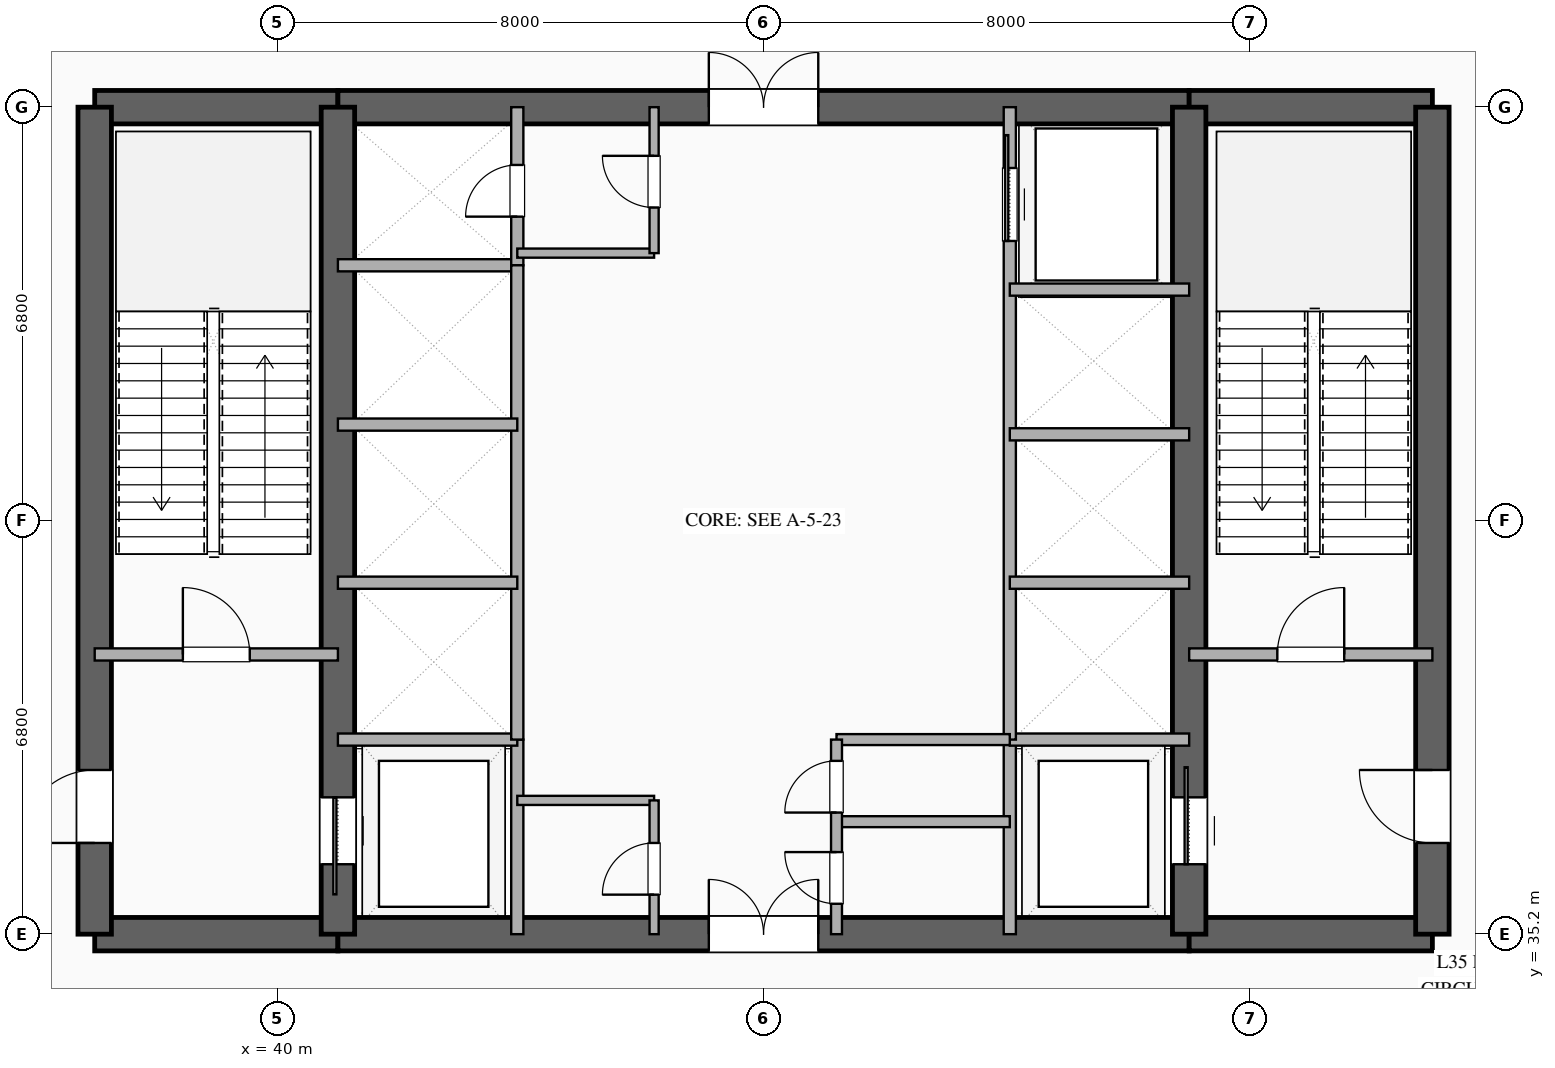
"""IFC4 building model, lengths in metres.
Left out: names, types, materials, properties, quantities, classifications, styles, units other than length and angle.
Written with IfcOpenShell. Run it as: python <this file> out.ifc"""

import sys

from ifc_helpers import new_model, si_unit, direction, frame, frame_2d, origin, place, context, subcontext, project, spatial, rectangle, extrude, element, fill, save


model = new_model("IFC4")
c1 = context("Model", 3, precision=1e-05, world=origin(), true_north=direction((0.0, 1.0)))
c2 = subcontext(c1, "Body", "Model", "MODEL_VIEW")
j1 = project(units=[si_unit("LENGTHUNIT", "METRE"), si_unit("PLANEANGLEUNIT", "RADIAN")], contexts=[c1])
p1 = place(None, origin())
s1 = spatial("IfcSite", under=j1, at=p1, CompositionType="ELEMENT")
p2 = place(p1, origin())
s2 = spatial("IfcBuilding", under=s1, at=p2, CompositionType="ELEMENT")
p3 = place(p2, frame((0.0, 0.0, 139.8)))
s3 = spatial("IfcBuildingStorey", under=s2, at=p3, CompositionType="ELEMENT", Elevation=139.8)
p4 = place(p3, frame((37.0, 35.2, 0.0), z_axis=(0.0, 0.0, 1.0), x_axis=(1.0, 0.0, 0.0)))
e1 = element("IfcWall", 1, at=p4, inside=s3, PredefinedType="SHEAR", context=c2, shape_type="SweptSolid", body=[
    extrude(rectangle(XDim=4.0, YDim=0.55, at=frame_2d((2.0, 0.0))), origin(), (0.0, 0.0, 1.0), 5.05),
])
p5 = place(p3, frame((41.0, 35.2, 0.0), z_axis=(0.0, 0.0, 1.0), x_axis=(1.0, 0.0, 0.0)))
e2 = element("IfcWall", 2, at=p5, inside=s3, PredefinedType="SHEAR", context=c2, shape_type="SweptSolid", body=[
    extrude(rectangle(XDim=14.0, YDim=0.55, at=frame_2d((7.0, 0.0))), origin(), (0.0, 0.0, 1.0), 5.05),
])
p6 = place(p5, frame((6.1, 0.0, 0.0)))
e3 = element("IfcOpeningElement", 3, at=p6, cuts=e2, PredefinedType="OPENING", context=c2, shape_type="SweptSolid", body=[
    extrude(rectangle(XDim=1.8, YDim=2.25, at=frame_2d((0.9, 1.125))), frame((0.0, 0.285, 0.0), z_axis=(0.0, -1.0, 0.0), x_axis=(1.0, 0.0, 0.0)), (0.0, 0.0, 1.0), 0.57),
])
for number, where, z_axis, x_axis in (
    (4, (55.0, 35.2, 0.0), (0.0, 0.0, 1.0), (1.0, 0.0, 0.0)),
    (5, (37.0, 48.8, 0.0), (0.0, 0.0, 1.0), (1.0, 0.0, 0.0)),
):
    element("IfcWall", number, at=place(p3, frame(where, z_axis=z_axis, x_axis=x_axis)), inside=s3, PredefinedType="SHEAR", context=c2, shape_type="SweptSolid", body=[
        extrude(rectangle(XDim=4.0, YDim=0.55, at=frame_2d((2.0, 0.0))), origin(), (0.0, 0.0, 1.0), 5.05),
    ])
p7 = place(p3, frame((41.0, 48.8, 0.0), z_axis=(0.0, 0.0, 1.0), x_axis=(1.0, 0.0, 0.0)))
e6 = element("IfcWall", 6, at=p7, inside=s3, PredefinedType="SHEAR", context=c2, shape_type="SweptSolid", body=[
    extrude(rectangle(XDim=14.0, YDim=0.55, at=frame_2d((7.0, 0.0))), origin(), (0.0, 0.0, 1.0), 5.05),
])
p8 = place(p7, frame((6.1, 0.0, 0.0)))
e7 = element("IfcOpeningElement", 7, at=p8, cuts=e6, PredefinedType="OPENING", context=c2, shape_type="SweptSolid", body=[
    extrude(rectangle(XDim=1.8, YDim=2.25, at=frame_2d((0.9, 1.125))), frame((0.0, 0.285, 0.0), z_axis=(0.0, -1.0, 0.0), x_axis=(1.0, 0.0, 0.0)), (0.0, 0.0, 1.0), 0.57),
])
p9 = place(p3, frame((55.0, 48.8, 0.0), z_axis=(0.0, 0.0, 1.0), x_axis=(1.0, 0.0, 0.0)))
e8 = element("IfcWall", 8, at=p9, inside=s3, PredefinedType="SHEAR", context=c2, shape_type="SweptSolid", body=[
    extrude(rectangle(XDim=4.0, YDim=0.55, at=frame_2d((2.0, 0.0))), origin(), (0.0, 0.0, 1.0), 5.05),
])
p10 = place(p3, frame((37.0, 35.2, 0.0), z_axis=(0.0, 0.0, 1.0), x_axis=(0.0, 1.0, 0.0)))
e9 = element("IfcWall", 9, at=p10, inside=s3, PredefinedType="SHEAR", context=c2, shape_type="SweptSolid", body=[
    extrude(rectangle(XDim=13.6, YDim=0.55, at=frame_2d((6.8, 0.0))), origin(), (0.0, 0.0, 1.0), 5.05),
])
p11 = place(p10, frame((1.5, 0.0, 0.0)))
e10 = element("IfcOpeningElement", 10, at=p11, cuts=e9, PredefinedType="OPENING", context=c2, shape_type="SweptSolid", body=[
    extrude(rectangle(XDim=1.2, YDim=2.15, at=frame_2d((0.6, 1.075))), frame((0.0, 0.285, 0.0), z_axis=(0.0, -1.0, 0.0), x_axis=(1.0, 0.0, 0.0)), (0.0, 0.0, 1.0), 0.57),
])
p12 = place(p3, frame((59.0, 35.2, 0.0), z_axis=(0.0, 0.0, 1.0), x_axis=(0.0, 1.0, 0.0)))
e11 = element("IfcWall", 11, at=p12, inside=s3, PredefinedType="SHEAR", context=c2, shape_type="SweptSolid", body=[
    extrude(rectangle(XDim=13.6, YDim=0.55, at=frame_2d((6.8, 0.0))), origin(), (0.0, 0.0, 1.0), 5.05),
])
p13 = place(p12, frame((1.5, 0.0, 0.0)))
e12 = element("IfcOpeningElement", 12, at=p13, cuts=e11, PredefinedType="OPENING", context=c2, shape_type="SweptSolid", body=[
    extrude(rectangle(XDim=1.2, YDim=2.15, at=frame_2d((0.6, 1.075))), frame((0.0, 0.285, 0.0), z_axis=(0.0, -1.0, 0.0), x_axis=(1.0, 0.0, 0.0)), (0.0, 0.0, 1.0), 0.57),
])
p14 = place(p3, frame((41.0, 35.2, 0.0), z_axis=(0.0, 0.0, 1.0), x_axis=(0.0, 1.0, 0.0)))
e13 = element("IfcWall", 13, at=p14, inside=s3, PredefinedType="SHEAR", context=c2, shape_type="SweptSolid", body=[
    extrude(rectangle(XDim=13.6, YDim=0.55, at=frame_2d((6.8, 0.0))), origin(), (0.0, 0.0, 1.0), 5.05),
])
p15 = place(p14, frame((1.15, 0.0, 0.0)))
e14 = element("IfcOpeningElement", 14, at=p15, cuts=e13, PredefinedType="OPENING", context=c2, shape_type="SweptSolid", body=[
    extrude(rectangle(XDim=1.1, YDim=2.2, at=frame_2d((0.55, 1.1))), frame((0.0, 0.285, 0.0), z_axis=(0.0, -1.0, 0.0), x_axis=(1.0, 0.0, 0.0)), (0.0, 0.0, 1.0), 0.57),
])
p16 = place(p3, frame((55.0, 35.2, 0.0), z_axis=(0.0, 0.0, 1.0), x_axis=(0.0, 1.0, 0.0)))
e15 = element("IfcWall", 15, at=p16, inside=s3, PredefinedType="SHEAR", context=c2, shape_type="SweptSolid", body=[
    extrude(rectangle(XDim=13.6, YDim=0.55, at=frame_2d((6.8, 0.0))), origin(), (0.0, 0.0, 1.0), 5.05),
])
p17 = place(p16, frame((1.15, 0.0, 0.0)))
e16 = element("IfcOpeningElement", 16, at=p17, cuts=e15, PredefinedType="OPENING", context=c2, shape_type="SweptSolid", body=[
    extrude(rectangle(XDim=1.1, YDim=2.2, at=frame_2d((0.55, 1.1))), frame((0.0, 0.285, 0.0), z_axis=(0.0, -1.0, 0.0), x_axis=(1.0, 0.0, 0.0)), (0.0, 0.0, 1.0), 0.57),
])
p18 = place(p3, frame((37.0, 39.8, 0.0), z_axis=(0.0, 0.0, 1.0), x_axis=(1.0, 0.0, 0.0)))
e17 = element("IfcWall", 17, at=p18, inside=s3, PredefinedType="SOLIDWALL", context=c2, shape_type="SweptSolid", body=[
    extrude(rectangle(XDim=4.0, YDim=0.2, at=frame_2d((2.0, 0.0))), origin(), (0.0, 0.0, 1.0), 3.35),
])
p19 = place(p18, frame((1.45, 0.0, 0.0)))
e18 = element("IfcOpeningElement", 18, at=p19, cuts=e17, PredefinedType="OPENING", context=c2, shape_type="SweptSolid", body=[
    extrude(rectangle(XDim=1.1, YDim=2.15, at=frame_2d((0.55, 1.075))), frame((0.0, 0.11, 0.0), z_axis=(0.0, -1.0, 0.0), x_axis=(1.0, 0.0, 0.0)), (0.0, 0.0, 1.0), 0.22),
])
p20 = place(p3, frame((55.0, 39.8, 0.0), z_axis=(0.0, 0.0, 1.0), x_axis=(1.0, 0.0, 0.0)))
e19 = element("IfcWall", 19, at=p20, inside=s3, PredefinedType="SOLIDWALL", context=c2, shape_type="SweptSolid", body=[
    extrude(rectangle(XDim=4.0, YDim=0.2, at=frame_2d((2.0, 0.0))), origin(), (0.0, 0.0, 1.0), 3.35),
])
p21 = place(p20, frame((1.45, 0.0, 0.0)))
e20 = element("IfcOpeningElement", 20, at=p21, cuts=e19, PredefinedType="OPENING", context=c2, shape_type="SweptSolid", body=[
    extrude(rectangle(XDim=1.1, YDim=2.15, at=frame_2d((0.55, 1.075))), frame((0.0, 0.11, 0.0), z_axis=(0.0, -1.0, 0.0), x_axis=(1.0, 0.0, 0.0)), (0.0, 0.0, 1.0), 0.22),
])
p22 = place(p3, frame((43.95, 35.2, 0.0), z_axis=(0.0, 0.0, 1.0), x_axis=(0.0, 1.0, 0.0)))
e21 = element("IfcWall", 21, at=p22, inside=s3, PredefinedType="SOLIDWALL", context=c2, shape_type="SweptSolid", body=[
    extrude(rectangle(XDim=3.2, YDim=0.2, at=frame_2d((1.6, 0.0))), origin(), (0.0, 0.0, 1.0), 3.35),
])
p23 = place(p3, frame((41.0, 38.4, 0.0), z_axis=(0.0, 0.0, 1.0), x_axis=(1.0, 0.0, 0.0)))
e22 = element("IfcWall", 22, at=p23, inside=s3, PredefinedType="SOLIDWALL", context=c2, shape_type="SweptSolid", body=[
    extrude(rectangle(XDim=2.95, YDim=0.2, at=frame_2d((1.475, 0.0))), origin(), (0.0, 0.0, 1.0), 3.35),
])
p24 = place(p3, frame((52.05, 35.2, 0.0), z_axis=(0.0, 0.0, 1.0), x_axis=(0.0, 1.0, 0.0)))
e23 = element("IfcWall", 23, at=p24, inside=s3, PredefinedType="SOLIDWALL", context=c2, shape_type="SweptSolid", body=[
    extrude(rectangle(XDim=3.2, YDim=0.2, at=frame_2d((1.6, 0.0))), origin(), (0.0, 0.0, 1.0), 3.35),
])
for number, where, z_axis, x_axis in (
    (24, (52.05, 38.4, 0.0), (0.0, 0.0, 1.0), (1.0, 0.0, 0.0)),
    (25, (41.0, 46.2, 0.0), (0.0, 0.0, 1.0), (1.0, 0.0, 0.0)),
):
    element("IfcWall", number, at=place(p3, frame(where, z_axis=z_axis, x_axis=x_axis)), inside=s3, PredefinedType="SOLIDWALL", context=c2, shape_type="SweptSolid", body=[
        extrude(rectangle(XDim=2.95, YDim=0.2, at=frame_2d((1.475, 0.0))), origin(), (0.0, 0.0, 1.0), 3.35),
    ])
p25 = place(p3, frame((43.95, 46.2, 0.0), z_axis=(0.0, 0.0, 1.0), x_axis=(0.0, 1.0, 0.0)))
e26 = element("IfcWall", 26, at=p25, inside=s3, PredefinedType="SOLIDWALL", context=c2, shape_type="SweptSolid", body=[
    extrude(rectangle(XDim=2.6, YDim=0.2, at=frame_2d((1.3, 0.0))), origin(), (0.0, 0.0, 1.0), 3.35),
])
p26 = place(p25, frame((0.8, 0.0, 0.0)))
e27 = element("IfcOpeningElement", 27, at=p26, cuts=e26, PredefinedType="OPENING", context=c2, shape_type="SweptSolid", body=[
    extrude(rectangle(XDim=0.85, YDim=2.15, at=frame_2d((0.425, 1.075))), frame((0.0, 0.11, 0.0), z_axis=(0.0, -1.0, 0.0), x_axis=(1.0, 0.0, 0.0)), (0.0, 0.0, 1.0), 0.22),
])
p27 = place(p3, frame((43.95, 38.4, 0.0), z_axis=(0.0, 0.0, 1.0), x_axis=(0.0, 1.0, 0.0)))
e28 = element("IfcWall", 28, at=p27, inside=s3, PredefinedType="SOLIDWALL", context=c2, shape_type="SweptSolid", body=[
    extrude(rectangle(XDim=7.8, YDim=0.2, at=frame_2d((3.9, 0.0))), origin(), (0.0, 0.0, 1.0), 3.35),
])
for number, where, z_axis, x_axis in (
    (29, (41.0, 40.98, 0.0), (0.0, 0.0, 1.0), (1.0, 0.0, 0.0)),
    (30, (41.0, 43.58, 0.0), (0.0, 0.0, 1.0), (1.0, 0.0, 0.0)),
):
    element("IfcWall", number, at=place(p3, frame(where, z_axis=z_axis, x_axis=x_axis)), inside=s3, PredefinedType="SOLIDWALL", context=c2, shape_type="SweptSolid", body=[
        extrude(rectangle(XDim=2.95, YDim=0.2, at=frame_2d((1.475, 0.0))), origin(), (0.0, 0.0, 1.0), 3.35),
    ])
p28 = place(p3, frame((52.05, 38.4, 0.0), z_axis=(0.0, 0.0, 1.0), x_axis=(0.0, 1.0, 0.0)))
e31 = element("IfcWall", 31, at=p28, inside=s3, PredefinedType="SOLIDWALL", context=c2, shape_type="SweptSolid", body=[
    extrude(rectangle(XDim=10.4, YDim=0.2, at=frame_2d((5.2, 0.0))), origin(), (0.0, 0.0, 1.0), 3.35),
])
p29 = place(p28, frame((8.2, 0.0, 0.0)))
e32 = element("IfcOpeningElement", 32, at=p29, cuts=e31, PredefinedType="OPENING", context=c2, shape_type="SweptSolid", body=[
    extrude(rectangle(XDim=1.2, YDim=2.2, at=frame_2d((0.6, 1.1))), frame((0.0, 0.11, 0.0), z_axis=(0.0, -1.0, 0.0), x_axis=(1.0, 0.0, 0.0)), (0.0, 0.0, 1.0), 0.22),
])
for number, where, z_axis, x_axis in (
    (33, (52.05, 40.98, 0.0), (0.0, 0.0, 1.0), (1.0, 0.0, 0.0)),
    (34, (52.05, 43.42, 0.0), (0.0, 0.0, 1.0), (1.0, 0.0, 0.0)),
    (35, (52.05, 45.8, 0.0), (0.0, 0.0, 1.0), (1.0, 0.0, 0.0)),
):
    element("IfcWall", number, at=place(p3, frame(where, z_axis=z_axis, x_axis=x_axis)), inside=s3, PredefinedType="SOLIDWALL", context=c2, shape_type="SweptSolid", body=[
        extrude(rectangle(XDim=2.95, YDim=0.2, at=frame_2d((1.475, 0.0))), origin(), (0.0, 0.0, 1.0), 3.35),
    ])
p30 = place(p3, frame((43.95, 37.4, 0.0), z_axis=(0.0, 0.0, 1.0), x_axis=(1.0, 0.0, 0.0)))
e36 = element("IfcWall", 36, at=p30, inside=s3, PredefinedType="PARTITIONING", context=c2, shape_type="SweptSolid", body=[
    extrude(rectangle(XDim=2.25, YDim=0.15, at=frame_2d((1.125, 0.0))), origin(), (0.0, 0.0, 1.0), 3.35),
])
p31 = place(p3, frame((46.2, 35.2, 0.0), z_axis=(0.0, 0.0, 1.0), x_axis=(0.0, 1.0, 0.0)))
e37 = element("IfcWall", 37, at=p31, inside=s3, PredefinedType="PARTITIONING", context=c2, shape_type="SweptSolid", body=[
    extrude(rectangle(XDim=2.2, YDim=0.15, at=frame_2d((1.1, 0.0))), origin(), (0.0, 0.0, 1.0), 3.35),
])
p32 = place(p31, frame((0.65, 0.0, 0.0)))
e38 = element("IfcOpeningElement", 38, at=p32, cuts=e37, PredefinedType="OPENING", context=c2, shape_type="SweptSolid", body=[
    extrude(rectangle(XDim=0.85, YDim=2.15, at=frame_2d((0.425, 1.075))), frame((0.0, 0.085, 0.0), z_axis=(0.0, -1.0, 0.0), x_axis=(1.0, 0.0, 0.0)), (0.0, 0.0, 1.0), 0.17),
])
p33 = place(p3, frame((43.95, 46.4, 0.0), z_axis=(0.0, 0.0, 1.0), x_axis=(1.0, 0.0, 0.0)))
e39 = element("IfcWall", 39, at=p33, inside=s3, PredefinedType="PARTITIONING", context=c2, shape_type="SweptSolid", body=[
    extrude(rectangle(XDim=2.25, YDim=0.15, at=frame_2d((1.125, 0.0))), origin(), (0.0, 0.0, 1.0), 3.35),
])
p34 = place(p3, frame((46.2, 46.4, 0.0), z_axis=(0.0, 0.0, 1.0), x_axis=(0.0, 1.0, 0.0)))
e40 = element("IfcWall", 40, at=p34, inside=s3, PredefinedType="PARTITIONING", context=c2, shape_type="SweptSolid", body=[
    extrude(rectangle(XDim=2.4, YDim=0.15, at=frame_2d((1.2, 0.0))), origin(), (0.0, 0.0, 1.0), 3.35),
])
p35 = place(p34, frame((0.75, 0.0, 0.0)))
e41 = element("IfcOpeningElement", 41, at=p35, cuts=e40, PredefinedType="OPENING", context=c2, shape_type="SweptSolid", body=[
    extrude(rectangle(XDim=0.85, YDim=2.15, at=frame_2d((0.425, 1.075))), frame((0.0, 0.085, 0.0), z_axis=(0.0, -1.0, 0.0), x_axis=(1.0, 0.0, 0.0)), (0.0, 0.0, 1.0), 0.17),
])
for number, where, z_axis, x_axis in (
    (42, (49.2, 37.05, 0.0), (0.0, 0.0, 1.0), (1.0, 0.0, 0.0)),
    (43, (49.2, 38.4, 0.0), (0.0, 0.0, 1.0), (1.0, 0.0, 0.0)),
):
    element("IfcWall", number, at=place(p3, frame(where, z_axis=z_axis, x_axis=x_axis)), inside=s3, PredefinedType="PLUMBINGWALL", context=c2, shape_type="SweptSolid", body=[
        extrude(rectangle(XDim=2.85, YDim=0.18, at=frame_2d((1.425, 0.0))), origin(), (0.0, 0.0, 1.0), 3.35),
    ])
p36 = place(p3, frame((49.2, 35.2, 0.0), z_axis=(0.0, 0.0, 1.0), x_axis=(0.0, 1.0, 0.0)))
e44 = element("IfcWall", 44, at=p36, inside=s3, PredefinedType="PLUMBINGWALL", context=c2, shape_type="SweptSolid", body=[
    extrude(rectangle(XDim=3.2, YDim=0.18, at=frame_2d((1.6, 0.0))), origin(), (0.0, 0.0, 1.0), 3.35),
])
p37 = place(p36, frame((0.5, 0.0, 0.0)))
e45 = element("IfcOpeningElement", 45, at=p37, cuts=e44, PredefinedType="OPENING", context=c2, shape_type="SweptSolid", body=[
    extrude(rectangle(XDim=0.85, YDim=2.1, at=frame_2d((0.425, 1.05))), frame((0.0, 0.1, 0.0), z_axis=(0.0, -1.0, 0.0), x_axis=(1.0, 0.0, 0.0)), (0.0, 0.0, 1.0), 0.2),
])
p38 = place(p36, frame((2.0, 0.0, 0.0)))
e46 = element("IfcOpeningElement", 46, at=p38, cuts=e44, PredefinedType="OPENING", context=c2, shape_type="SweptSolid", body=[
    extrude(rectangle(XDim=0.85, YDim=2.15, at=frame_2d((0.425, 1.075))), frame((0.0, 0.1, 0.0), z_axis=(0.0, -1.0, 0.0), x_axis=(1.0, 0.0, 0.0)), (0.0, 0.0, 1.0), 0.2),
])
p39 = place(p15, origin())
e47 = element("IfcDoor", 47, at=p39, inside=s3, OperationType="SLIDING_TO_LEFT", PredefinedType="DOOR", context=c2, shape_type="SweptSolid", body=[
    extrude(rectangle(XDim=1.1, YDim=2.2, at=frame_2d((0.55, 1.1))), frame((0.0, 0.025, 0.0), z_axis=(0.0, -1.0, 0.0), x_axis=(1.0, 0.0, 0.0)), (0.0, 0.0, 1.0), 0.05),
])
fill(e14, e47)
p40 = place(p17, origin())
e48 = element("IfcDoor", 48, at=p40, inside=s3, OperationType="SLIDING_TO_RIGHT", PredefinedType="DOOR", context=c2, shape_type="SweptSolid", body=[
    extrude(rectangle(XDim=1.1, YDim=2.2, at=frame_2d((0.55, 1.1))), frame((0.0, 0.025, 0.0), z_axis=(0.0, -1.0, 0.0), x_axis=(1.0, 0.0, 0.0)), (0.0, 0.0, 1.0), 0.05),
])
fill(e16, e48)
p41 = place(p11, origin())
e49 = element("IfcDoor", 49, at=p41, inside=s3, OperationType="SINGLE_SWING_LEFT", PredefinedType="DOOR", context=c2, shape_type="SweptSolid", body=[
    extrude(rectangle(XDim=1.2, YDim=2.15, at=frame_2d((0.6, 1.075))), frame((0.0, 0.025, 0.0), z_axis=(0.0, -1.0, 0.0), x_axis=(1.0, 0.0, 0.0)), (0.0, 0.0, 1.0), 0.05),
])
fill(e10, e49)
p42 = place(p13, origin())
e50 = element("IfcDoor", 50, at=p42, inside=s3, OperationType="SINGLE_SWING_RIGHT", PredefinedType="DOOR", context=c2, shape_type="SweptSolid", body=[
    extrude(rectangle(XDim=1.2, YDim=2.15, at=frame_2d((0.6, 1.075))), frame((0.0, 0.025, 0.0), z_axis=(0.0, -1.0, 0.0), x_axis=(1.0, 0.0, 0.0)), (0.0, 0.0, 1.0), 0.05),
])
fill(e12, e50)
p43 = place(p6, origin())
e51 = element("IfcDoor", 51, at=p43, inside=s3, OperationType="DOUBLE_DOOR_SINGLE_SWING", PredefinedType="DOOR", context=c2, shape_type="SweptSolid", body=[
    extrude(rectangle(XDim=1.8, YDim=2.25, at=frame_2d((0.9, 1.125))), frame((0.0, 0.025, 0.0), z_axis=(0.0, -1.0, 0.0), x_axis=(1.0, 0.0, 0.0)), (0.0, 0.0, 1.0), 0.05),
])
fill(e3, e51)
p44 = place(p8, origin())
e52 = element("IfcDoor", 52, at=p44, inside=s3, OperationType="DOUBLE_DOOR_SINGLE_SWING", PredefinedType="DOOR", context=c2, shape_type="SweptSolid", body=[
    extrude(rectangle(XDim=1.8, YDim=2.25, at=frame_2d((0.9, 1.125))), frame((0.0, 0.025, 0.0), z_axis=(0.0, -1.0, 0.0), x_axis=(1.0, 0.0, 0.0)), (0.0, 0.0, 1.0), 0.05),
])
fill(e7, e52)
p45 = place(p19, origin())
e53 = element("IfcDoor", 53, at=p45, inside=s3, OperationType="SINGLE_SWING_LEFT", PredefinedType="DOOR", context=c2, shape_type="SweptSolid", body=[
    extrude(rectangle(XDim=1.1, YDim=2.15, at=frame_2d((0.55, 1.075))), frame((0.0, 0.025, 0.0), z_axis=(0.0, -1.0, 0.0), x_axis=(1.0, 0.0, 0.0)), (0.0, 0.0, 1.0), 0.05),
])
fill(e18, e53)
p46 = place(p21, origin())
e54 = element("IfcDoor", 54, at=p46, inside=s3, OperationType="SINGLE_SWING_RIGHT", PredefinedType="DOOR", context=c2, shape_type="SweptSolid", body=[
    extrude(rectangle(XDim=1.1, YDim=2.15, at=frame_2d((0.55, 1.075))), frame((0.0, 0.025, 0.0), z_axis=(0.0, -1.0, 0.0), x_axis=(1.0, 0.0, 0.0)), (0.0, 0.0, 1.0), 0.05),
])
fill(e20, e54)
p47 = place(p26, origin())
e55 = element("IfcDoor", 55, at=p47, inside=s3, OperationType="SINGLE_SWING_LEFT", PredefinedType="DOOR", context=c2, shape_type="SweptSolid", body=[
    extrude(rectangle(XDim=0.85, YDim=2.15, at=frame_2d((0.425, 1.075))), frame((0.0, 0.025, 0.0), z_axis=(0.0, -1.0, 0.0), x_axis=(1.0, 0.0, 0.0)), (0.0, 0.0, 1.0), 0.05),
])
fill(e27, e55)
p48 = place(p29, origin())
e56 = element("IfcDoor", 56, at=p48, inside=s3, OperationType="SLIDING_TO_RIGHT", PredefinedType="DOOR", context=c2, shape_type="SweptSolid", body=[
    extrude(rectangle(XDim=1.2, YDim=2.2, at=frame_2d((0.6, 1.1))), frame((0.0, 0.025, 0.0), z_axis=(0.0, -1.0, 0.0), x_axis=(1.0, 0.0, 0.0)), (0.0, 0.0, 1.0), 0.05),
])
fill(e32, e56)
p49 = place(p32, origin())
e57 = element("IfcDoor", 57, at=p49, inside=s3, OperationType="SINGLE_SWING_LEFT", PredefinedType="DOOR", context=c2, shape_type="SweptSolid", body=[
    extrude(rectangle(XDim=0.85, YDim=2.15, at=frame_2d((0.425, 1.075))), frame((0.0, 0.025, 0.0), z_axis=(0.0, -1.0, 0.0), x_axis=(1.0, 0.0, 0.0)), (0.0, 0.0, 1.0), 0.05),
])
fill(e38, e57)
p50 = place(p35, origin())
e58 = element("IfcDoor", 58, at=p50, inside=s3, OperationType="SINGLE_SWING_RIGHT", PredefinedType="DOOR", context=c2, shape_type="SweptSolid", body=[
    extrude(rectangle(XDim=0.85, YDim=2.15, at=frame_2d((0.425, 1.075))), frame((0.0, 0.025, 0.0), z_axis=(0.0, -1.0, 0.0), x_axis=(1.0, 0.0, 0.0)), (0.0, 0.0, 1.0), 0.05),
])
fill(e41, e58)
p51 = place(p37, origin())
e59 = element("IfcDoor", 59, at=p51, inside=s3, OperationType="SINGLE_SWING_RIGHT", PredefinedType="DOOR", context=c2, shape_type="SweptSolid", body=[
    extrude(rectangle(XDim=0.85, YDim=2.1, at=frame_2d((0.425, 1.05))), frame((0.0, 0.025, 0.0), z_axis=(0.0, -1.0, 0.0), x_axis=(1.0, 0.0, 0.0)), (0.0, 0.0, 1.0), 0.05),
])
fill(e45, e59)
p52 = place(p38, origin())
e60 = element("IfcDoor", 60, at=p52, inside=s3, OperationType="SINGLE_SWING_LEFT", PredefinedType="DOOR", context=c2, shape_type="SweptSolid", body=[
    extrude(rectangle(XDim=0.85, YDim=2.15, at=frame_2d((0.425, 1.075))), frame((0.0, 0.025, 0.0), z_axis=(0.0, -1.0, 0.0), x_axis=(1.0, 0.0, 0.0)), (0.0, 0.0, 1.0), 0.05),
])
fill(e46, e60)
save(model, sys.argv[1])
